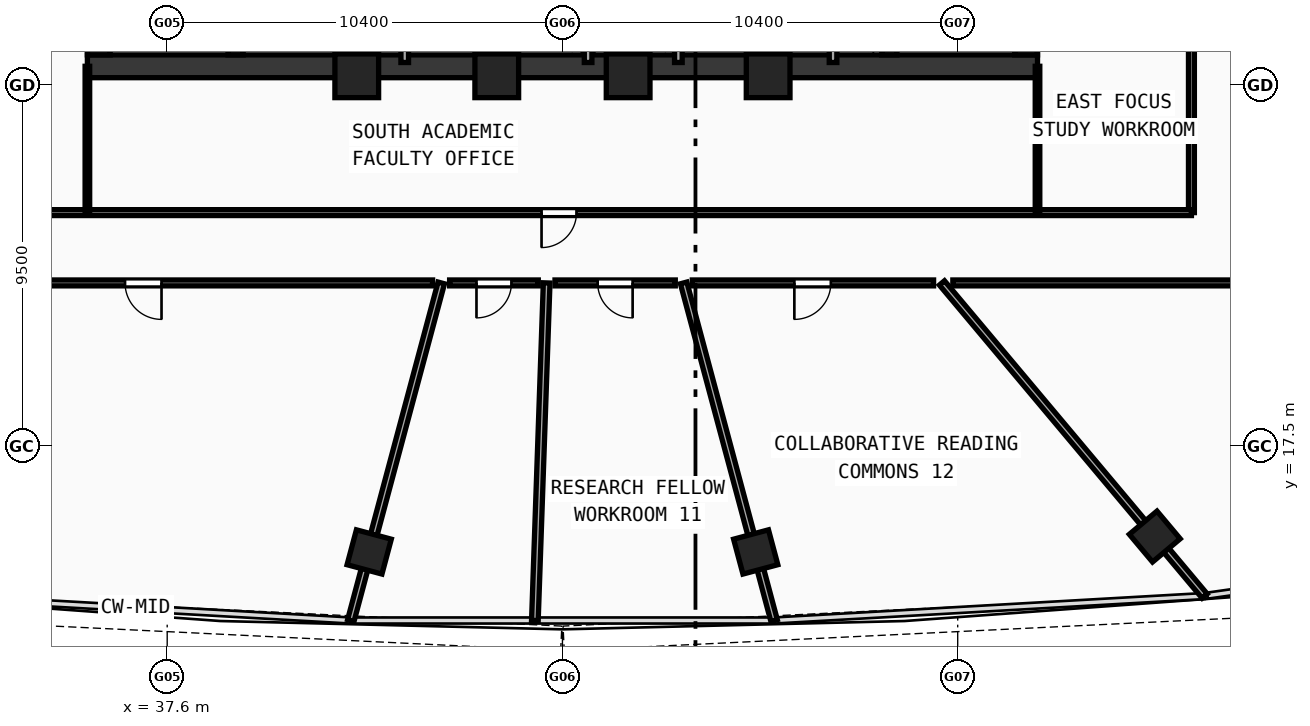
"""IFC4 building model, lengths in metres.
Left out: names, types, materials, properties, quantities, classifications, styles, units other than length and angle.
Written with IfcOpenShell. Run it as: python <this file> out.ifc"""

import sys

from ifc_helpers import new_model, si_unit, direction, frame, frame_2d, origin, origin_with_axes, origin_2d, place, context, subcontext, project, spatial, rectangle, hollow_rectangle, extrude, source, transform, mapped, element, fill, save


model = new_model("IFC4")
c1 = context("Model", 3, precision=1e-05, world=origin(), true_north=direction((0.0, 1.0)))
c2 = subcontext(c1, "Body", "Model", "MODEL_VIEW")
j1 = project(units=[si_unit("LENGTHUNIT", "METRE"), si_unit("PLANEANGLEUNIT", "RADIAN")], contexts=[c1])
p1 = place(None, origin())
s1 = spatial("IfcSite", under=j1, at=p1, CompositionType="ELEMENT")
p2 = place(p1, origin())
s2 = spatial("IfcBuilding", under=s1, at=p2, CompositionType="ELEMENT")
p3 = place(p2, frame((0.0, 0.0, 129.83)))
s3 = spatial("IfcBuildingStorey", under=s2, at=p3, CompositionType="ELEMENT", Elevation=129.83)
p4 = place(p3, frame((35.5, 27.5, 0.0), z_axis=(0.0, 0.0, 1.0), x_axis=(1.0, 0.0, 0.0)))
e1 = element("IfcWall", 1, at=p4, inside=s3, PredefinedType="SHEAR", context=c2, shape_type="SweptSolid", body=[
    extrude(rectangle(XDim=25.0, YDim=0.6, at=frame_2d((12.5, 0.0))), origin(), (0.0, 0.0, 1.0), 3.42),
])
for number, where, z_axis, x_axis in (
    (2, (35.8, 27.8, 0.0), (0.0, 0.0, 1.0), (0.0, 1.0, 0.0)),
    (3, (60.2, 27.8, 0.0), (0.0, 0.0, 1.0), (0.0, 1.0, 0.0)),
):
    element("IfcWall", number, at=place(p3, frame(where, z_axis=z_axis, x_axis=x_axis)), inside=s3, PredefinedType="SHEAR", context=c2, shape_type="SweptSolid", body=[
        extrude(rectangle(XDim=12.1, YDim=0.6, at=frame_2d((6.05, 0.0))), origin(), (0.0, 0.0, 1.0), 3.42),
    ])
p5 = place(p3, frame((39.4, 27.8, 0.0), z_axis=(0.0, 0.0, 1.0), x_axis=(0.0, 1.0, 0.0)))
e4 = element("IfcWall", 4, at=p5, inside=s3, PredefinedType="SHEAR", context=c2, shape_type="SweptSolid", body=[
    extrude(rectangle(XDim=12.1, YDim=0.4, at=frame_2d((6.05, 0.0))), origin(), (0.0, 0.0, 1.0), 3.42),
])
p6 = place(p5, frame((9.95, 0.0, 0.0)))
e5 = element("IfcOpeningElement", 5, at=p6, cuts=e4, PredefinedType="OPENING", context=c2, shape_type="SweptSolid", body=[
    extrude(rectangle(XDim=1.1, YDim=2.1, at=frame_2d((0.55, 1.05))), frame((0.0, 0.21, 0.0), z_axis=(0.0, -1.0, 0.0), x_axis=(1.0, 0.0, 0.0)), (0.0, 0.0, 1.0), 0.42),
])
p7 = place(p3, frame((56.6, 27.8, 0.0), z_axis=(0.0, 0.0, 1.0), x_axis=(0.0, 1.0, 0.0)))
e6 = element("IfcWall", 6, at=p7, inside=s3, PredefinedType="SHEAR", context=c2, shape_type="SweptSolid", body=[
    extrude(rectangle(XDim=12.1, YDim=0.4, at=frame_2d((6.05, 0.0))), origin(), (0.0, 0.0, 1.0), 3.42),
])
p8 = place(p7, frame((9.95, 0.0, 0.0)))
e7 = element("IfcOpeningElement", 7, at=p8, cuts=e6, PredefinedType="OPENING", context=c2, shape_type="SweptSolid", body=[
    extrude(rectangle(XDim=1.1, YDim=2.1, at=frame_2d((0.55, 1.05))), frame((0.0, 0.21, 0.0), z_axis=(0.0, -1.0, 0.0), x_axis=(1.0, 0.0, 0.0)), (0.0, 0.0, 1.0), 0.42),
])
m1 = source(origin(), c2, "Body", "SweptSolid", [
    extrude(hollow_rectangle(XDim=1.15, YDim=1.15, WallThickness=0.048, at=origin_2d()), origin(), (0.0, 0.0, 1.0), 3.68),
])
for number, where, z_axis, x_axis in (
    (8, (42.588, 27.25, -0.26), (0.0, 0.0, 1.0), (1.0, 0.0, 0.0)),
    (9, (46.272, 27.25, -0.26), (0.0, 0.0, 1.0), (1.0, 0.0, 0.0)),
    (10, (49.729, 27.25, -0.26), (0.0, 0.0, 1.0), (1.0, 0.0, 0.0)),
    (11, (53.412, 27.25, -0.26), (0.0, 0.0, 1.0), (1.0, 0.0, 0.0)),
):
    element("IfcColumn", number, at=place(p3, frame(where, z_axis=z_axis, x_axis=x_axis)), inside=s3, PredefinedType="COLUMN", context=c2, shape_type="MappedRepresentation", body=[
        mapped(m1, transform((0.0, 0.0, 0.0), scale=1.0)),
    ])
m2 = source(origin(), c2, "Body", "SweptSolid", [
    extrude(hollow_rectangle(XDim=0.95, YDim=0.95, WallThickness=0.04, at=origin_2d()), origin(), (0.0, 0.0, 1.0), 3.68),
])
for number, where, z_axis, x_axis in (
    (12, (42.915, 14.722, -0.26), (0.0, 0.0, 1.0), (0.966, -0.259, 0.0)),
    (13, (53.085, 14.722, -0.26), (0.0, 0.0, 1.0), (0.966, 0.259, 0.0)),
    (14, (63.585, 15.126, -0.26), (0.0, 0.0, 1.0), (0.766, 0.643, 0.0)),
):
    element("IfcColumn", number, at=place(p3, frame(where, z_axis=z_axis, x_axis=x_axis)), inside=s3, PredefinedType="COLUMN", context=c2, shape_type="MappedRepresentation", body=[
        mapped(m2, transform((0.0, 0.0, 0.0), scale=1.0)),
    ])
p9 = place(p3, frame((43.85, 27.6, 0.0), z_axis=(0.0, 0.0, 1.0), x_axis=(0.0, 1.0, 0.0)))
e15 = element("IfcWall", 15, at=p9, inside=s3, PredefinedType="SOLIDWALL", context=c2, shape_type="SweptSolid", body=[
    extrude(rectangle(XDim=6.22, YDim=0.2, at=frame_2d((3.11, 0.0))), origin(), (0.0, 0.0, 1.0), 3.42),
])
p10 = place(p9, frame((2.25, 0.0, 0.0)))
e16 = element("IfcOpeningElement", 16, at=p10, cuts=e15, PredefinedType="OPENING", context=c2, shape_type="SweptSolid", body=[
    extrude(rectangle(XDim=1.05, YDim=2.1, at=frame_2d((0.525, 1.05))), frame((0.0, 0.11, 0.0), z_axis=(0.0, -1.0, 0.0), x_axis=(1.0, 0.0, 0.0)), (0.0, 0.0, 1.0), 0.22),
])
p11 = place(p3, frame((53.68, 27.6, 0.0), z_axis=(0.0, 0.0, 1.0), x_axis=(0.0, 1.0, 0.0)))
e17 = element("IfcWall", 17, at=p11, inside=s3, PredefinedType="SOLIDWALL", context=c2, shape_type="SweptSolid", body=[
    extrude(rectangle(XDim=9.05, YDim=0.2, at=frame_2d((4.525, 0.0))), origin(), (0.0, 0.0, 1.0), 3.42),
])
p12 = place(p11, frame((6.9, 0.0, 0.0)))
e18 = element("IfcOpeningElement", 18, at=p12, cuts=e17, PredefinedType="OPENING", context=c2, shape_type="SweptSolid", body=[
    extrude(rectangle(XDim=1.05, YDim=2.1, at=frame_2d((0.525, 1.05))), frame((0.0, 0.11, 0.0), z_axis=(0.0, -1.0, 0.0), x_axis=(1.0, 0.0, 0.0)), (0.0, 0.0, 1.0), 0.22),
])
for number, where, z_axis, x_axis in (
    (19, (51.05, 27.6, 0.0), (0.0, 0.0, 1.0), (0.0, 1.0, 0.0)),
    (20, (46.225, 27.6, 0.0), (0.0, 0.0, 1.0), (0.0, 1.0, 0.0)),
    (21, (48.675, 27.6, 0.0), (0.0, 0.0, 1.0), (0.0, 1.0, 0.0)),
    (22, (55.12, 27.6, 0.0), (0.0, 0.0, 1.0), (0.0, 1.0, 0.0)),
):
    element("IfcWall", number, at=place(p3, frame(where, z_axis=z_axis, x_axis=x_axis)), inside=s3, PredefinedType="SOLIDWALL", context=c2, shape_type="SweptSolid", body=[
        extrude(rectangle(XDim=2.12, YDim=0.2, at=frame_2d((1.06, 0.0))), origin(), (0.0, 0.0, 1.0), 3.42),
    ])
p13 = place(p3, frame((42.32, 27.6, 0.0), z_axis=(0.0, 0.0, 1.0), x_axis=(0.0, 1.0, 0.0)))
e23 = element("IfcWall", 23, at=p13, inside=s3, PredefinedType="PARTITIONING", context=c2, shape_type="SweptSolid", body=[
    extrude(rectangle(XDim=5.9, YDim=0.155, at=frame_2d((2.95, 0.0))), origin(), (0.0, 0.0, 1.0), 3.42),
])
p14 = place(p13, frame((1.1, 0.0, 0.0)))
e24 = element("IfcOpeningElement", 24, at=p14, cuts=e23, PredefinedType="OPENING", context=c2, shape_type="SweptSolid", body=[
    extrude(rectangle(XDim=0.9, YDim=2.1, at=frame_2d((0.45, 1.05))), frame((0.0, 0.087, 0.0), z_axis=(0.0, -1.0, 0.0), x_axis=(1.0, 0.0, 0.0)), (0.0, 0.0, 1.0), 0.175),
])
p15 = place(p13, frame((3.6, 0.0, 0.0)))
e25 = element("IfcOpeningElement", 25, at=p15, cuts=e23, PredefinedType="OPENING", context=c2, shape_type="SweptSolid", body=[
    extrude(rectangle(XDim=0.94, YDim=2.1, at=frame_2d((0.47, 1.05))), frame((0.0, 0.087, 0.0), z_axis=(0.0, -1.0, 0.0), x_axis=(1.0, 0.0, 0.0)), (0.0, 0.0, 1.0), 0.175),
])
p16 = place(p3, frame((64.55, 23.65, 0.0), z_axis=(0.0, 0.0, 1.0), x_axis=(0.0, 1.0, 0.0)))
e26 = element("IfcWall", 26, at=p16, inside=s3, PredefinedType="PARTITIONING", context=c2, shape_type="SweptSolid", body=[
    extrude(rectangle(XDim=16.6, YDim=0.155, at=frame_2d((8.3, 0.0))), origin(), (0.0, 0.0, 1.0), 2.77),
])
p17 = place(p16, frame((7.5, 0.0, 0.0)))
e27 = element("IfcOpeningElement", 27, at=p17, cuts=e26, PredefinedType="OPENING", context=c2, shape_type="SweptSolid", body=[
    extrude(rectangle(XDim=0.9, YDim=2.08, at=frame_2d((0.45, 1.04))), frame((0.0, 0.087, 0.0), z_axis=(0.0, -1.0, 0.0), x_axis=(1.0, 0.0, 0.0)), (0.0, 0.0, 1.0), 0.175),
])
p18 = place(p3, frame((31.45, 23.65, 0.0), z_axis=(0.0, 0.0, 1.0), x_axis=(1.0, 0.0, 0.0)))
e28 = element("IfcWall", 28, at=p18, inside=s3, PredefinedType="PARTITIONING", context=c2, shape_type="SweptSolid", body=[
    extrude(rectangle(XDim=33.1, YDim=0.155, at=frame_2d((16.55, 0.0))), origin(), (0.0, 0.0, 1.0), 2.77),
])
p19 = place(p18, frame((16.0, 0.0, 0.0)))
e29 = element("IfcOpeningElement", 29, at=p19, cuts=e28, PredefinedType="OPENING", context=c2, shape_type="SweptSolid", body=[
    extrude(rectangle(XDim=0.92, YDim=2.1, at=frame_2d((0.46, 1.05))), frame((0.0, 0.087, 0.0), z_axis=(0.0, -1.0, 0.0), x_axis=(1.0, 0.0, 0.0)), (0.0, 0.0, 1.0), 0.175),
])
for number, where, z_axis, x_axis in (
    (30, (35.5, 23.65, 0.0), (0.0, 0.0, 1.0), (0.0, 1.0, 0.0)),
    (31, (60.5, 23.65, 0.0), (0.0, 0.0, 1.0), (0.0, 1.0, 0.0)),
):
    element("IfcWall", number, at=place(p3, frame(where, z_axis=z_axis, x_axis=x_axis)), inside=s3, PredefinedType="PARTITIONING", context=c2, shape_type="SweptSolid", body=[
        extrude(rectangle(XDim=3.85, YDim=0.12, at=frame_2d((1.925, 0.0))), origin(), (0.0, 0.0, 1.0), 3.02),
    ])
p20 = place(p3, frame((44.811, 21.8, 0.0), z_axis=(0.0, 0.0, 1.0), x_axis=(-0.258799340884, -0.965931105803, 0.0)))
e32 = element("IfcWall", 32, at=p20, inside=s3, PredefinedType="PARTITIONING", context=c2, shape_type="SweptSolid", body=[
    extrude(rectangle(XDim=9.196, YDim=0.175, at=frame_2d((4.598, 0.0))), origin(), (0.0, 0.0, 1.0), 2.77),
])
p21 = place(p3, frame((47.584, 21.8, 0.0), z_axis=(0.0, 0.0, 1.0), x_axis=(-0.034885165757, -0.999391327364, 0.0)))
e33 = element("IfcWall", 33, at=p21, inside=s3, PredefinedType="PARTITIONING", context=c2, shape_type="SweptSolid", body=[
    extrude(rectangle(XDim=8.888, YDim=0.175, at=frame_2d((4.444, 0.0))), origin(), (0.0, 0.0, 1.0), 2.77),
])
p22 = place(p3, frame((51.189, 21.8, 0.0), z_axis=(0.0, 0.0, 1.0), x_axis=(0.258799340884, -0.965931105803, 0.0)))
e34 = element("IfcWall", 34, at=p22, inside=s3, PredefinedType="PARTITIONING", context=c2, shape_type="SweptSolid", body=[
    extrude(rectangle(XDim=9.196, YDim=0.175, at=frame_2d((4.598, 0.0))), origin(), (0.0, 0.0, 1.0), 2.77),
])
p23 = place(p3, frame((57.985, 21.8, 0.0), z_axis=(0.0, 0.0, 1.0), x_axis=(0.642770875896, -0.766058484125, 0.0)))
e35 = element("IfcWall", 35, at=p23, inside=s3, PredefinedType="PARTITIONING", context=c2, shape_type="SweptSolid", body=[
    extrude(rectangle(XDim=10.755, YDim=0.175, at=frame_2d((5.377, 0.0))), origin(), (0.0, 0.0, 1.0), 2.77),
])
p24 = place(p3, frame((66.4, 21.8, 0.0), z_axis=(0.0, 0.0, 1.0), x_axis=(-1.0, 0.0, 0.0)))
e36 = element("IfcWall", 36, at=p24, inside=s3, PredefinedType="PARTITIONING", context=c2, shape_type="SweptSolid", body=[
    extrude(rectangle(XDim=8.127, YDim=0.155, at=frame_2d((4.064, 0.0))), origin(), (0.0, 0.0, 1.0), 3.02),
])
p25 = place(p3, frame((57.765, 21.8, 0.0), z_axis=(0.0, 0.0, 1.0), x_axis=(-1.0, 0.0, 0.0)))
e37 = element("IfcWall", 37, at=p25, inside=s3, PredefinedType="PARTITIONING", context=c2, shape_type="SweptSolid", body=[
    extrude(rectangle(XDim=6.349, YDim=0.155, at=frame_2d((3.174, 0.0))), origin(), (0.0, 0.0, 1.0), 2.77),
])
p26 = place(p25, frame((2.703, 0.0, 0.0)))
e38 = element("IfcOpeningElement", 38, at=p26, cuts=e37, PredefinedType="OPENING", context=c2, shape_type="SweptSolid", body=[
    extrude(rectangle(XDim=0.96, YDim=2.12, at=frame_2d((0.48, 1.06))), frame((0.0, 0.087, 0.0), z_axis=(0.0, -1.0, 0.0), x_axis=(1.0, 0.0, 0.0)), (0.0, 0.0, 1.0), 0.175),
])
p27 = place(p3, frame((50.969, 21.8, 0.0), z_axis=(0.0, 0.0, 1.0), x_axis=(-1.0, 0.0, 0.0)))
e39 = element("IfcWall", 39, at=p27, inside=s3, PredefinedType="PARTITIONING", context=c2, shape_type="SweptSolid", body=[
    extrude(rectangle(XDim=3.165, YDim=0.155, at=frame_2d((1.582, 0.0))), origin(), (0.0, 0.0, 1.0), 3.42),
])
p28 = place(p27, frame((1.122, 0.0, 0.0)))
e40 = element("IfcOpeningElement", 40, at=p28, cuts=e39, PredefinedType="OPENING", context=c2, shape_type="SweptSolid", body=[
    extrude(rectangle(XDim=0.92, YDim=2.1, at=frame_2d((0.46, 1.05))), frame((0.0, 0.087, 0.0), z_axis=(0.0, -1.0, 0.0), x_axis=(1.0, 0.0, 0.0)), (0.0, 0.0, 1.0), 0.175),
])
p29 = place(p3, frame((47.364, 21.8, 0.0), z_axis=(0.0, 0.0, 1.0), x_axis=(-1.0, 0.0, 0.0)))
e41 = element("IfcWall", 41, at=p29, inside=s3, PredefinedType="PARTITIONING", context=c2, shape_type="SweptSolid", body=[
    extrude(rectangle(XDim=2.333, YDim=0.155, at=frame_2d((1.167, 0.0))), origin(), (0.0, 0.0, 1.0), 3.42),
])
p30 = place(p29, frame((0.706, 0.0, 0.0)))
e42 = element("IfcOpeningElement", 42, at=p30, cuts=e41, PredefinedType="OPENING", context=c2, shape_type="SweptSolid", body=[
    extrude(rectangle(XDim=0.92, YDim=2.1, at=frame_2d((0.46, 1.05))), frame((0.0, 0.087, 0.0), z_axis=(0.0, -1.0, 0.0), x_axis=(1.0, 0.0, 0.0)), (0.0, 0.0, 1.0), 0.175),
])
p31 = place(p3, frame((44.583, 21.8, 0.0), z_axis=(0.0, 0.0, 1.0), x_axis=(-1.0, 0.0, 0.0)))
e43 = element("IfcWall", 43, at=p31, inside=s3, PredefinedType="PARTITIONING", context=c2, shape_type="SweptSolid", body=[
    extrude(rectangle(XDim=14.983, YDim=0.155, at=frame_2d((7.492, 0.0))), origin(), (0.0, 0.0, 1.0), 2.77),
])
p32 = place(p31, frame((7.133, 0.0, 0.0)))
e44 = element("IfcOpeningElement", 44, at=p32, cuts=e43, PredefinedType="OPENING", context=c2, shape_type="SweptSolid", body=[
    extrude(rectangle(XDim=0.96, YDim=2.12, at=frame_2d((0.48, 1.06))), frame((0.0, 0.087, 0.0), z_axis=(0.0, -1.0, 0.0), x_axis=(1.0, 0.0, 0.0)), (0.0, 0.0, 1.0), 0.175),
])
m3 = source(origin(), c2, "Body", "SweptSolid", [
    extrude(rectangle(XDim=0.92, YDim=2.1, at=frame_2d((0.46, 1.05))), frame((0.0, 0.025, 0.0), z_axis=(0.0, -1.0, 0.0), x_axis=(1.0, 0.0, 0.0)), (0.0, 0.0, 1.0), 0.05),
])
p33 = place(p19, frame((0.92, 0.0, 0.0), z_axis=(0.0, 0.0, 1.0), x_axis=(-1.0, 0.0, 0.0)))
e45 = element("IfcDoor", 45, at=p33, inside=s3, OperationType="SINGLE_SWING_RIGHT", PredefinedType="DOOR", context=c2, shape_type="MappedRepresentation", body=[
    mapped(m3, transform((0.0, 0.0, 0.0), scale=1.0)),
])
fill(e29, e45)
m4 = source(origin(), c2, "Body", "SweptSolid", [
    extrude(rectangle(XDim=0.96, YDim=2.12, at=frame_2d((0.48, 1.06))), frame((0.0, 0.025, 0.0), z_axis=(0.0, -1.0, 0.0), x_axis=(1.0, 0.0, 0.0)), (0.0, 0.0, 1.0), 0.05),
])
p34 = place(p32, origin_with_axes())
e46 = element("IfcDoor", 46, at=p34, inside=s3, OperationType="SINGLE_SWING_LEFT", PredefinedType="DOOR", context=c2, shape_type="MappedRepresentation", body=[
    mapped(m4, transform((0.0, 0.0, 0.0), scale=1.0)),
])
fill(e44, e46)
p35 = place(p30, origin_with_axes())
e47 = element("IfcDoor", 47, at=p35, inside=s3, OperationType="SINGLE_SWING_RIGHT", PredefinedType="DOOR", context=c2, shape_type="MappedRepresentation", body=[
    mapped(m3, transform((0.0, 0.0, 0.0), scale=1.0)),
])
fill(e42, e47)
p36 = place(p28, origin_with_axes())
e48 = element("IfcDoor", 48, at=p36, inside=s3, OperationType="SINGLE_SWING_LEFT", PredefinedType="DOOR", context=c2, shape_type="MappedRepresentation", body=[
    mapped(m3, transform((0.0, 0.0, 0.0), scale=1.0)),
])
fill(e40, e48)
p37 = place(p26, origin_with_axes())
e49 = element("IfcDoor", 49, at=p37, inside=s3, OperationType="SINGLE_SWING_RIGHT", PredefinedType="DOOR", context=c2, shape_type="MappedRepresentation", body=[
    mapped(m4, transform((0.0, 0.0, 0.0), scale=1.0)),
])
fill(e38, e49)
save(model, sys.argv[1])
